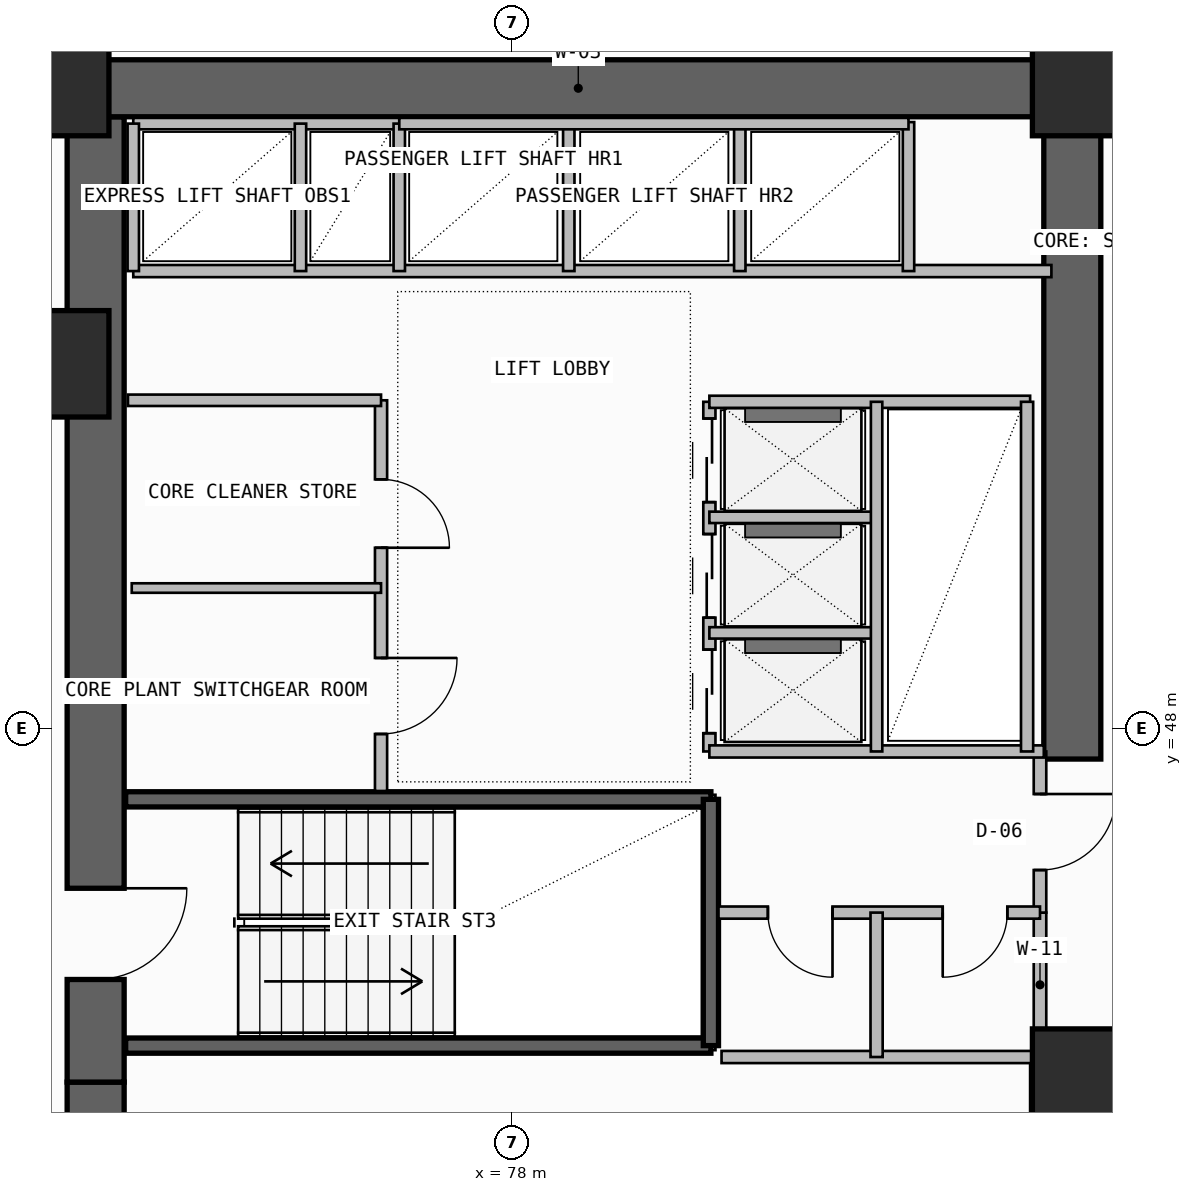
"""IFC4 building model, lengths in metres.
Left out: names, types, materials, properties, quantities, classifications, styles, units other than length and angle.
Written with IfcOpenShell. Run it as: python <this file> out.ifc"""

import sys

from ifc_helpers import new_model, si_unit, direction, frame, frame_2d, origin, origin_2d, place, context, subcontext, project, spatial, rectangle, extrude, element, fill, save


model = new_model("IFC4")
c1 = context("Model", 3, precision=1e-05, world=origin(), true_north=direction((0.0, 1.0)))
c2 = subcontext(c1, "Body", "Model", "MODEL_VIEW")
j1 = project(units=[si_unit("LENGTHUNIT", "METRE"), si_unit("PLANEANGLEUNIT", "RADIAN")], contexts=[c1])
p1 = place(None, origin())
s1 = spatial("IfcSite", under=j1, at=p1, CompositionType="ELEMENT")
p2 = place(p1, origin())
s2 = spatial("IfcBuilding", under=s1, at=p2, CompositionType="ELEMENT")
p3 = place(p2, frame((0.0, 0.0, 175.5)))
s3 = spatial("IfcBuildingStorey", under=s2, at=p3, CompositionType="ELEMENT", Elevation=175.5)
p4 = place(p3, frame((72.525, 35.5, -0.26), z_axis=(0.0, 0.0, 1.0), x_axis=(0.0, 1.0, 0.0)))
e1 = element("IfcWall", 1, at=p4, inside=s3, PredefinedType="SHEAR", context=c2, shape_type="SweptSolid", body=[
    extrude(rectangle(XDim=7.85, YDim=0.75, at=frame_2d((3.925, 0.0))), origin(), (0.0, 0.0, 1.0), 3.6),
])
p5 = place(p4, frame((1.45, 0.0, 0.26)))
e2 = element("IfcOpeningElement", 2, at=p5, cuts=e1, PredefinedType="OPENING", context=c2, shape_type="SweptSolid", body=[
    extrude(rectangle(XDim=1.2, YDim=2.2, at=frame_2d((0.6, 1.1))), frame((0.0, 0.385, 0.0), z_axis=(0.0, -1.0, 0.0), x_axis=(1.0, 0.0, 0.0)), (0.0, 0.0, 1.0), 0.77),
])
p6 = place(p3, frame((72.525, 43.35, -0.26), z_axis=(0.0, 0.0, 1.0), x_axis=(0.0, 1.0, 0.0)))
e3 = element("IfcWall", 3, at=p6, inside=s3, PredefinedType="SHEAR", context=c2, shape_type="SweptSolid", body=[
    extrude(rectangle(XDim=12.7, YDim=0.75, at=frame_2d((6.35, 0.0))), origin(), (0.0, 0.0, 1.0), 3.6),
])
p7 = place(p6, frame((1.35, 0.0, 0.26)))
e4 = element("IfcOpeningElement", 4, at=p7, cuts=e3, PredefinedType="OPENING", context=c2, shape_type="SweptSolid", body=[
    extrude(rectangle(XDim=1.2, YDim=2.2, at=frame_2d((0.6, 1.1))), frame((0.0, 0.385, 0.0), z_axis=(0.0, -1.0, 0.0), x_axis=(1.0, 0.0, 0.0)), (0.0, 0.0, 1.0), 0.77),
])
p8 = place(p3, frame((72.0, 56.425, -0.26), z_axis=(0.0, 0.0, 1.0), x_axis=(1.0, 0.0, 0.0)))
e5 = element("IfcWall", 5, at=p8, inside=s3, PredefinedType="SHEAR", context=c2, shape_type="SweptSolid", body=[
    extrude(rectangle(XDim=13.75, YDim=0.75, at=frame_2d((6.875, 0.0))), origin(), (0.0, 0.0, 1.0), 3.6),
])
p9 = place(p3, frame((85.375, 47.6, -0.26), z_axis=(0.0, 0.0, 1.0), x_axis=(0.0, 1.0, 0.0)))
e6 = element("IfcWall", 6, at=p9, inside=s3, PredefinedType="SHEAR", context=c2, shape_type="SweptSolid", body=[
    extrude(rectangle(XDim=8.45, YDim=0.75, at=frame_2d((4.225, 0.0))), origin(), (0.0, 0.0, 1.0), 3.6),
])
for number, where, z_axis, x_axis in (
    (7, (85.55, 43.35, 0.0), (0.0, 0.0, 1.0), (1.0, 0.0, 0.0)),
    (8, (72.0, 52.8, 0.0), (0.0, 0.0, 1.0), (1.0, 0.0, 0.0)),
    (9, (72.0, 56.5, 0.0), (0.0, 0.0, 1.0), (1.0, 0.0, 0.0)),
    (10, (85.55, 56.5, 0.0), (0.0, 0.0, 1.0), (1.0, 0.0, 0.0)),
):
    element("IfcColumn", number, at=place(p3, frame(where, z_axis=z_axis, x_axis=x_axis)), inside=s3, PredefinedType="COLUMN", context=c2, shape_type="SweptSolid", body=[
        extrude(rectangle(XDim=1.4, YDim=1.4, at=origin_2d()), origin(), (0.0, 0.0, 1.0), 3.6),
    ])
p10 = place(p3, frame((84.92, 38.85, 0.0), z_axis=(0.0, 0.0, 1.0), x_axis=(0.0, 1.0, 0.0)))
e11 = element("IfcWall", 11, at=p10, inside=s3, PredefinedType="SOLIDWALL", context=c2, shape_type="SweptSolid", body=[
    extrude(rectangle(XDim=4.83, YDim=0.2, at=frame_2d((2.415, 0.0))), origin(), (0.0, 0.0, 1.0), 3.34),
])
p11 = place(p10, frame((1.25, 0.0, 0.0)))
e12 = element("IfcOpeningElement", 12, at=p11, cuts=e11, PredefinedType="OPENING", context=c2, shape_type="SweptSolid", body=[
    extrude(rectangle(XDim=1.1, YDim=2.2, at=frame_2d((0.55, 1.1))), frame((0.0, 0.11, 0.0), z_axis=(0.0, -1.0, 0.0), x_axis=(1.0, 0.0, 0.0)), (0.0, 0.0, 1.0), 0.22),
])
for number, where, z_axis, x_axis in (
    (13, (72.92, 43.83, -0.26), (0.0, 0.0, 1.0), (1.0, 0.0, 0.0)),
    (14, (72.92, 47.07, -0.26), (0.0, 0.0, 1.0), (1.0, 0.0, 0.0)),
):
    element("IfcWall", number, at=place(p3, frame(where, z_axis=z_axis, x_axis=x_axis)), inside=s3, PredefinedType="SOLIDWALL", context=c2, shape_type="SweptSolid", body=[
        extrude(rectangle(XDim=7.7, YDim=0.2, at=frame_2d((3.85, 0.0))), origin(), (0.0, 0.0, 1.0), 3.6),
    ])
p12 = place(p3, frame((80.62, 43.83, -0.26), z_axis=(0.0, 0.0, 1.0), x_axis=(0.0, 1.0, 0.0)))
e15 = element("IfcWall", 15, at=p12, inside=s3, PredefinedType="SOLIDWALL", context=c2, shape_type="SweptSolid", body=[
    extrude(rectangle(XDim=3.24, YDim=0.2, at=frame_2d((1.62, 0.0))), origin(), (0.0, 0.0, 1.0), 3.6),
])
p13 = place(p3, frame((84.95, 43.68, 0.0), z_axis=(0.0, 0.0, 1.0), x_axis=(0.0, 1.0, 0.0)))
e16 = element("IfcWall", 16, at=p13, inside=s3, PredefinedType="PLUMBINGWALL", context=c2, shape_type="SweptSolid", body=[
    extrude(rectangle(XDim=1.9, YDim=0.165, at=frame_2d((0.95, 0.0))), origin(), (0.0, 0.0, 1.0), 3.34),
])
p14 = place(p3, frame((84.95, 45.58, 0.0), z_axis=(0.0, 0.0, 1.0), x_axis=(0.0, 1.0, 0.0)))
e17 = element("IfcWall", 17, at=p14, inside=s3, PredefinedType="PARTITIONING", context=c2, shape_type="SweptSolid", body=[
    extrude(rectangle(XDim=2.12, YDim=0.165, at=frame_2d((1.06, 0.0))), origin(), (0.0, 0.0, 1.0), 3.34),
])
p15 = place(p14, frame((0.56, 0.0, 0.0)))
e18 = element("IfcOpeningElement", 18, at=p15, cuts=e17, PredefinedType="OPENING", context=c2, shape_type="SweptSolid", body=[
    extrude(rectangle(XDim=1.0, YDim=2.2, at=frame_2d((0.5, 1.1))), frame((0.0, 0.093, 0.0), z_axis=(0.0, -1.0, 0.0), x_axis=(1.0, 0.0, 0.0)), (0.0, 0.0, 1.0), 0.185),
])
p16 = place(p3, frame((80.72, 45.58, 0.0), z_axis=(0.0, 0.0, 1.0), x_axis=(1.0, 0.0, 0.0)))
e19 = element("IfcWall", 19, at=p16, inside=s3, PredefinedType="PLUMBINGWALL", context=c2, shape_type="SweptSolid", body=[
    extrude(rectangle(XDim=4.23, YDim=0.16, at=frame_2d((2.115, 0.0))), origin(), (0.0, 0.0, 1.0), 3.34),
])
p17 = place(p16, frame((0.65, 0.0, 0.0)))
e20 = element("IfcOpeningElement", 20, at=p17, cuts=e19, PredefinedType="OPENING", context=c2, shape_type="SweptSolid", body=[
    extrude(rectangle(XDim=0.85, YDim=2.05, at=frame_2d((0.425, 1.025))), frame((0.0, 0.09, 0.0), z_axis=(0.0, -1.0, 0.0), x_axis=(1.0, 0.0, 0.0)), (0.0, 0.0, 1.0), 0.18),
])
p18 = place(p16, frame((2.95, 0.0, 0.0)))
e21 = element("IfcOpeningElement", 21, at=p18, cuts=e19, PredefinedType="OPENING", context=c2, shape_type="SweptSolid", body=[
    extrude(rectangle(XDim=0.85, YDim=2.05, at=frame_2d((0.425, 1.025))), frame((0.0, 0.09, 0.0), z_axis=(0.0, -1.0, 0.0), x_axis=(1.0, 0.0, 0.0)), (0.0, 0.0, 1.0), 0.18),
])
p19 = place(p3, frame((80.76, 43.68, 0.0), z_axis=(0.0, 0.0, 1.0), x_axis=(1.0, 0.0, 0.0)))
e22 = element("IfcWall", 22, at=p19, inside=s3, PredefinedType="PLUMBINGWALL", context=c2, shape_type="SweptSolid", body=[
    extrude(rectangle(XDim=4.19, YDim=0.16, at=frame_2d((2.095, 0.0))), origin(), (0.0, 0.0, 1.0), 3.34),
])
p20 = place(p3, frame((82.8, 43.68, 0.0), z_axis=(0.0, 0.0, 1.0), x_axis=(0.0, 1.0, 0.0)))
e23 = element("IfcWall", 23, at=p20, inside=s3, PredefinedType="PLUMBINGWALL", context=c2, shape_type="SweptSolid", body=[
    extrude(rectangle(XDim=1.9, YDim=0.16, at=frame_2d((0.95, 0.0))), origin(), (0.0, 0.0, 1.0), 3.34),
])
p21 = place(p3, frame((76.28, 47.18, 0.0), z_axis=(0.0, 0.0, 1.0), x_axis=(0.0, 1.0, 0.0)))
e24 = element("IfcWall", 24, at=p21, inside=s3, PredefinedType="SOLIDWALL", context=c2, shape_type="SweptSolid", body=[
    extrude(rectangle(XDim=5.14, YDim=0.16, at=frame_2d((2.57, 0.0))), origin(), (0.0, 0.0, 1.0), 3.34),
])
p22 = place(p21, frame((0.75, 0.0, 0.0)))
e25 = element("IfcOpeningElement", 25, at=p22, cuts=e24, PredefinedType="OPENING", context=c2, shape_type="SweptSolid", body=[
    extrude(rectangle(XDim=1.0, YDim=2.2, at=frame_2d((0.5, 1.1))), frame((0.0, 0.09, 0.0), z_axis=(0.0, -1.0, 0.0), x_axis=(1.0, 0.0, 0.0)), (0.0, 0.0, 1.0), 0.18),
])
p23 = place(p21, frame((3.2, 0.0, 0.0)))
e26 = element("IfcOpeningElement", 26, at=p23, cuts=e24, PredefinedType="OPENING", context=c2, shape_type="SweptSolid", body=[
    extrude(rectangle(XDim=0.9, YDim=2.1, at=frame_2d((0.45, 1.05))), frame((0.0, 0.09, 0.0), z_axis=(0.0, -1.0, 0.0), x_axis=(1.0, 0.0, 0.0)), (0.0, 0.0, 1.0), 0.18),
])
p24 = place(p3, frame((72.95, 52.32, 0.0), z_axis=(0.0, 0.0, 1.0), x_axis=(1.0, 0.0, 0.0)))
e27 = element("IfcWall", 27, at=p24, inside=s3, PredefinedType="SOLIDWALL", context=c2, shape_type="SweptSolid", body=[
    extrude(rectangle(XDim=3.33, YDim=0.15, at=frame_2d((1.665, 0.0))), origin(), (0.0, 0.0, 1.0), 3.34),
])
p25 = place(p3, frame((73.0, 49.85, 0.0), z_axis=(0.0, 0.0, 1.0), x_axis=(1.0, 0.0, 0.0)))
e28 = element("IfcWall", 28, at=p25, inside=s3, PredefinedType="PARTITIONING", context=c2, shape_type="SweptSolid", body=[
    extrude(rectangle(XDim=3.28, YDim=0.125, at=frame_2d((1.64, 0.0))), origin(), (0.0, 0.0, 1.0), 3.34),
])
p26 = place(p3, frame((80.6, 47.7, 0.0), z_axis=(0.0, 0.0, 1.0), x_axis=(0.0, 1.0, 0.0)))
e29 = element("IfcWall", 29, at=p26, inside=s3, PredefinedType="SOLIDWALL", context=c2, shape_type="SweptSolid", body=[
    extrude(rectangle(XDim=4.6, YDim=0.16, at=frame_2d((2.3, 0.0))), origin(), (0.0, 0.0, 1.0), 3.34),
])
p27 = place(p26, frame((0.24, 0.0, 0.0)))
e30 = element("IfcOpeningElement", 30, at=p27, cuts=e29, PredefinedType="OPENING", context=c2, shape_type="SweptSolid", body=[
    extrude(rectangle(XDim=1.1, YDim=2.25, at=frame_2d((0.55, 1.125))), frame((0.0, 0.09, 0.0), z_axis=(0.0, -1.0, 0.0), x_axis=(1.0, 0.0, 0.0)), (0.0, 0.0, 1.0), 0.18),
])
p28 = place(p26, frame((1.76, 0.0, 0.0)))
e31 = element("IfcOpeningElement", 31, at=p28, cuts=e29, PredefinedType="OPENING", context=c2, shape_type="SweptSolid", body=[
    extrude(rectangle(XDim=1.1, YDim=2.25, at=frame_2d((0.55, 1.125))), frame((0.0, 0.09, 0.0), z_axis=(0.0, -1.0, 0.0), x_axis=(1.0, 0.0, 0.0)), (0.0, 0.0, 1.0), 0.18),
])
p29 = place(p26, frame((3.28, 0.0, 0.0)))
e32 = element("IfcOpeningElement", 32, at=p29, cuts=e29, PredefinedType="OPENING", context=c2, shape_type="SweptSolid", body=[
    extrude(rectangle(XDim=1.1, YDim=2.25, at=frame_2d((0.55, 1.125))), frame((0.0, 0.09, 0.0), z_axis=(0.0, -1.0, 0.0), x_axis=(1.0, 0.0, 0.0)), (0.0, 0.0, 1.0), 0.18),
])
p30 = place(p3, frame((80.6, 47.7, 0.0), z_axis=(0.0, 0.0, 1.0), x_axis=(1.0, 0.0, 0.0)))
e33 = element("IfcWall", 33, at=p30, inside=s3, PredefinedType="SOLIDWALL", context=c2, shape_type="SweptSolid", body=[
    extrude(rectangle(XDim=4.4, YDim=0.16, at=frame_2d((2.2, 0.0))), origin(), (0.0, 0.0, 1.0), 3.34),
])
p31 = place(p3, frame((80.6, 52.3, 0.0), z_axis=(0.0, 0.0, 1.0), x_axis=(1.0, 0.0, 0.0)))
e34 = element("IfcWall", 34, at=p31, inside=s3, PredefinedType="SOLIDWALL", context=c2, shape_type="SweptSolid", body=[
    extrude(rectangle(XDim=4.22, YDim=0.16, at=frame_2d((2.11, 0.0))), origin(), (0.0, 0.0, 1.0), 3.34),
])
for number, where, z_axis, x_axis in (
    (35, (80.6, 49.26, 0.0), (0.0, 0.0, 1.0), (1.0, 0.0, 0.0)),
    (36, (80.6, 50.78, 0.0), (0.0, 0.0, 1.0), (1.0, 0.0, 0.0)),
):
    element("IfcWall", number, at=place(p3, frame(where, z_axis=z_axis, x_axis=x_axis)), inside=s3, PredefinedType="PLUMBINGWALL", context=c2, shape_type="SweptSolid", body=[
        extrude(rectangle(XDim=2.2, YDim=0.15, at=frame_2d((1.1, 0.0))), origin(), (0.0, 0.0, 1.0), 3.34),
    ])
p32 = place(p3, frame((82.8, 47.7, 0.0), z_axis=(0.0, 0.0, 1.0), x_axis=(0.0, 1.0, 0.0)))
e37 = element("IfcWall", 37, at=p32, inside=s3, PredefinedType="PLUMBINGWALL", context=c2, shape_type="SweptSolid", body=[
    extrude(rectangle(XDim=4.6, YDim=0.15, at=frame_2d((2.3, 0.0))), origin(), (0.0, 0.0, 1.0), 3.34),
])
p33 = place(p3, frame((84.78, 47.7, 0.0), z_axis=(0.0, 0.0, 1.0), x_axis=(0.0, 1.0, 0.0)))
e38 = element("IfcWall", 38, at=p33, inside=s3, PredefinedType="SOLIDWALL", context=c2, shape_type="SweptSolid", body=[
    extrude(rectangle(XDim=4.6, YDim=0.16, at=frame_2d((2.3, 0.0))), origin(), (0.0, 0.0, 1.0), 3.34),
])
p34 = place(p3, frame((73.02, 54.02, 0.0), z_axis=(0.0, 0.0, 1.0), x_axis=(1.0, 0.0, 0.0)))
e39 = element("IfcWall", 39, at=p34, inside=s3, PredefinedType="SOLIDWALL", context=c2, shape_type="SweptSolid", body=[
    extrude(rectangle(XDim=12.08, YDim=0.16, at=frame_2d((6.04, 0.0))), origin(), (0.0, 0.0, 1.0), 3.34),
])
p35 = place(p3, frame((73.02, 55.96, 0.0), z_axis=(0.0, 0.0, 1.0), x_axis=(1.0, 0.0, 0.0)))
e40 = element("IfcWall", 40, at=p35, inside=s3, PredefinedType="SOLIDWALL", context=c2, shape_type="SweptSolid", body=[
    extrude(rectangle(XDim=3.5, YDim=0.15, at=frame_2d((1.75, 0.0))), origin(), (0.0, 0.0, 1.0), 3.34),
])
p36 = place(p3, frame((73.02, 54.02, 0.0), z_axis=(0.0, 0.0, 1.0), x_axis=(0.0, 1.0, 0.0)))
e41 = element("IfcWall", 41, at=p36, inside=s3, PredefinedType="PLUMBINGWALL", context=c2, shape_type="SweptSolid", body=[
    extrude(rectangle(XDim=1.94, YDim=0.15, at=frame_2d((0.97, 0.0))), origin(), (0.0, 0.0, 1.0), 3.34),
])
p37 = place(p3, frame((76.52, 54.02, 0.0), z_axis=(0.0, 0.0, 1.0), x_axis=(0.0, 1.0, 0.0)))
e42 = element("IfcWall", 42, at=p37, inside=s3, PredefinedType="SOLIDWALL", context=c2, shape_type="SweptSolid", body=[
    extrude(rectangle(XDim=1.94, YDim=0.15, at=frame_2d((0.97, 0.0))), origin(), (0.0, 0.0, 1.0), 3.34),
])
p38 = place(p3, frame((75.22, 54.02, 0.0), z_axis=(0.0, 0.0, 1.0), x_axis=(0.0, 1.0, 0.0)))
e43 = element("IfcWall", 43, at=p38, inside=s3, PredefinedType="PLUMBINGWALL", context=c2, shape_type="SweptSolid", body=[
    extrude(rectangle(XDim=1.94, YDim=0.15, at=frame_2d((0.97, 0.0))), origin(), (0.0, 0.0, 1.0), 3.34),
])
for number, where, z_axis, x_axis in (
    (44, (78.75, 54.02, 0.0), (0.0, 0.0, 1.0), (0.0, 1.0, 0.0)),
    (45, (81.0, 54.02, 0.0), (0.0, 0.0, 1.0), (0.0, 1.0, 0.0)),
):
    element("IfcWall", number, at=place(p3, frame(where, z_axis=z_axis, x_axis=x_axis)), inside=s3, PredefinedType="PLUMBINGWALL", context=c2, shape_type="SweptSolid", body=[
        extrude(rectangle(XDim=1.96, YDim=0.15, at=frame_2d((0.98, 0.0))), origin(), (0.0, 0.0, 1.0), 3.34),
    ])
p39 = place(p3, frame((83.22, 54.02, 0.0), z_axis=(0.0, 0.0, 1.0), x_axis=(0.0, 1.0, 0.0)))
e46 = element("IfcWall", 46, at=p39, inside=s3, PredefinedType="SOLIDWALL", context=c2, shape_type="SweptSolid", body=[
    extrude(rectangle(XDim=1.96, YDim=0.15, at=frame_2d((0.98, 0.0))), origin(), (0.0, 0.0, 1.0), 3.34),
])
p40 = place(p3, frame((76.52, 55.96, 0.0), z_axis=(0.0, 0.0, 1.0), x_axis=(1.0, 0.0, 0.0)))
e47 = element("IfcWall", 47, at=p40, inside=s3, PredefinedType="SOLIDWALL", context=c2, shape_type="SweptSolid", body=[
    extrude(rectangle(XDim=6.7, YDim=0.15, at=frame_2d((3.35, 0.0))), origin(), (0.0, 0.0, 1.0), 3.34),
])
p41 = place(p7, frame((1.2, 0.0, 0.0), z_axis=(0.0, 0.0, 1.0), x_axis=(-1.0, 0.0, 0.0)))
e48 = element("IfcDoor", 48, at=p41, inside=s3, OperationType="SINGLE_SWING_LEFT", PredefinedType="USERDEFINED", context=c2, shape_type="SweptSolid", body=[
    extrude(rectangle(XDim=1.2, YDim=2.2, at=frame_2d((0.6, 1.1))), frame((0.0, 0.025, 0.0), z_axis=(0.0, -1.0, 0.0), x_axis=(1.0, 0.0, 0.0)), (0.0, 0.0, 1.0), 0.05),
])
fill(e4, e48)
p42 = place(p15, frame((1.0, 0.0, 0.0), z_axis=(0.0, 0.0, 1.0), x_axis=(-1.0, 0.0, 0.0)))
e49 = element("IfcDoor", 49, at=p42, inside=s3, OperationType="SINGLE_SWING_LEFT", PredefinedType="DOOR", context=c2, shape_type="SweptSolid", body=[
    extrude(rectangle(XDim=1.0, YDim=2.2, at=frame_2d((0.5, 1.1))), frame((0.0, 0.025, 0.0), z_axis=(0.0, -1.0, 0.0), x_axis=(1.0, 0.0, 0.0)), (0.0, 0.0, 1.0), 0.05),
])
fill(e18, e49)
p43 = place(p17, frame((0.85, 0.0, 0.0), z_axis=(0.0, 0.0, 1.0), x_axis=(-1.0, 0.0, 0.0)))
e50 = element("IfcDoor", 50, at=p43, inside=s3, OperationType="SINGLE_SWING_LEFT", PredefinedType="DOOR", context=c2, shape_type="SweptSolid", body=[
    extrude(rectangle(XDim=0.85, YDim=2.05, at=frame_2d((0.425, 1.025))), frame((0.0, 0.025, 0.0), z_axis=(0.0, -1.0, 0.0), x_axis=(1.0, 0.0, 0.0)), (0.0, 0.0, 1.0), 0.05),
])
fill(e20, e50)
p44 = place(p18, frame((0.85, 0.0, 0.0), z_axis=(0.0, 0.0, 1.0), x_axis=(-1.0, 0.0, 0.0)))
e51 = element("IfcDoor", 51, at=p44, inside=s3, OperationType="SINGLE_SWING_RIGHT", PredefinedType="DOOR", context=c2, shape_type="SweptSolid", body=[
    extrude(rectangle(XDim=0.85, YDim=2.05, at=frame_2d((0.425, 1.025))), frame((0.0, 0.025, 0.0), z_axis=(0.0, -1.0, 0.0), x_axis=(1.0, 0.0, 0.0)), (0.0, 0.0, 1.0), 0.05),
])
fill(e21, e51)
p45 = place(p22, frame((1.0, 0.0, 0.0), z_axis=(0.0, 0.0, 1.0), x_axis=(-1.0, 0.0, 0.0)))
e52 = element("IfcDoor", 52, at=p45, inside=s3, OperationType="SINGLE_SWING_LEFT", PredefinedType="DOOR", context=c2, shape_type="SweptSolid", body=[
    extrude(rectangle(XDim=1.0, YDim=2.2, at=frame_2d((0.5, 1.1))), frame((0.0, 0.025, 0.0), z_axis=(0.0, -1.0, 0.0), x_axis=(1.0, 0.0, 0.0)), (0.0, 0.0, 1.0), 0.05),
])
fill(e25, e52)
p46 = place(p23, frame((0.9, 0.0, 0.0), z_axis=(0.0, 0.0, 1.0), x_axis=(-1.0, 0.0, 0.0)))
e53 = element("IfcDoor", 53, at=p46, inside=s3, OperationType="SINGLE_SWING_RIGHT", PredefinedType="DOOR", context=c2, shape_type="SweptSolid", body=[
    extrude(rectangle(XDim=0.9, YDim=2.1, at=frame_2d((0.45, 1.05))), frame((0.0, 0.025, 0.0), z_axis=(0.0, -1.0, 0.0), x_axis=(1.0, 0.0, 0.0)), (0.0, 0.0, 1.0), 0.05),
])
fill(e26, e53)
p47 = place(p27, frame((1.1, 0.0, 0.0), z_axis=(0.0, 0.0, 1.0), x_axis=(-1.0, 0.0, 0.0)))
e54 = element("IfcDoor", 54, at=p47, inside=s3, OperationType="DOUBLE_DOOR_SLIDING", PredefinedType="DOOR", context=c2, shape_type="SweptSolid", body=[
    extrude(rectangle(XDim=1.1, YDim=2.25, at=frame_2d((0.55, 1.125))), frame((0.0, 0.025, 0.0), z_axis=(0.0, -1.0, 0.0), x_axis=(1.0, 0.0, 0.0)), (0.0, 0.0, 1.0), 0.05),
])
fill(e30, e54)
p48 = place(p28, frame((1.1, 0.0, 0.0), z_axis=(0.0, 0.0, 1.0), x_axis=(-1.0, 0.0, 0.0)))
e55 = element("IfcDoor", 55, at=p48, inside=s3, OperationType="DOUBLE_DOOR_SLIDING", PredefinedType="DOOR", context=c2, shape_type="SweptSolid", body=[
    extrude(rectangle(XDim=1.1, YDim=2.25, at=frame_2d((0.55, 1.125))), frame((0.0, 0.025, 0.0), z_axis=(0.0, -1.0, 0.0), x_axis=(1.0, 0.0, 0.0)), (0.0, 0.0, 1.0), 0.05),
])
fill(e31, e55)
p49 = place(p29, frame((1.1, 0.0, 0.0), z_axis=(0.0, 0.0, 1.0), x_axis=(-1.0, 0.0, 0.0)))
e56 = element("IfcDoor", 56, at=p49, inside=s3, OperationType="DOUBLE_DOOR_SLIDING", PredefinedType="DOOR", context=c2, shape_type="SweptSolid", body=[
    extrude(rectangle(XDim=1.1, YDim=2.25, at=frame_2d((0.55, 1.125))), frame((0.0, 0.025, 0.0), z_axis=(0.0, -1.0, 0.0), x_axis=(1.0, 0.0, 0.0)), (0.0, 0.0, 1.0), 0.05),
])
fill(e32, e56)
save(model, sys.argv[1])
